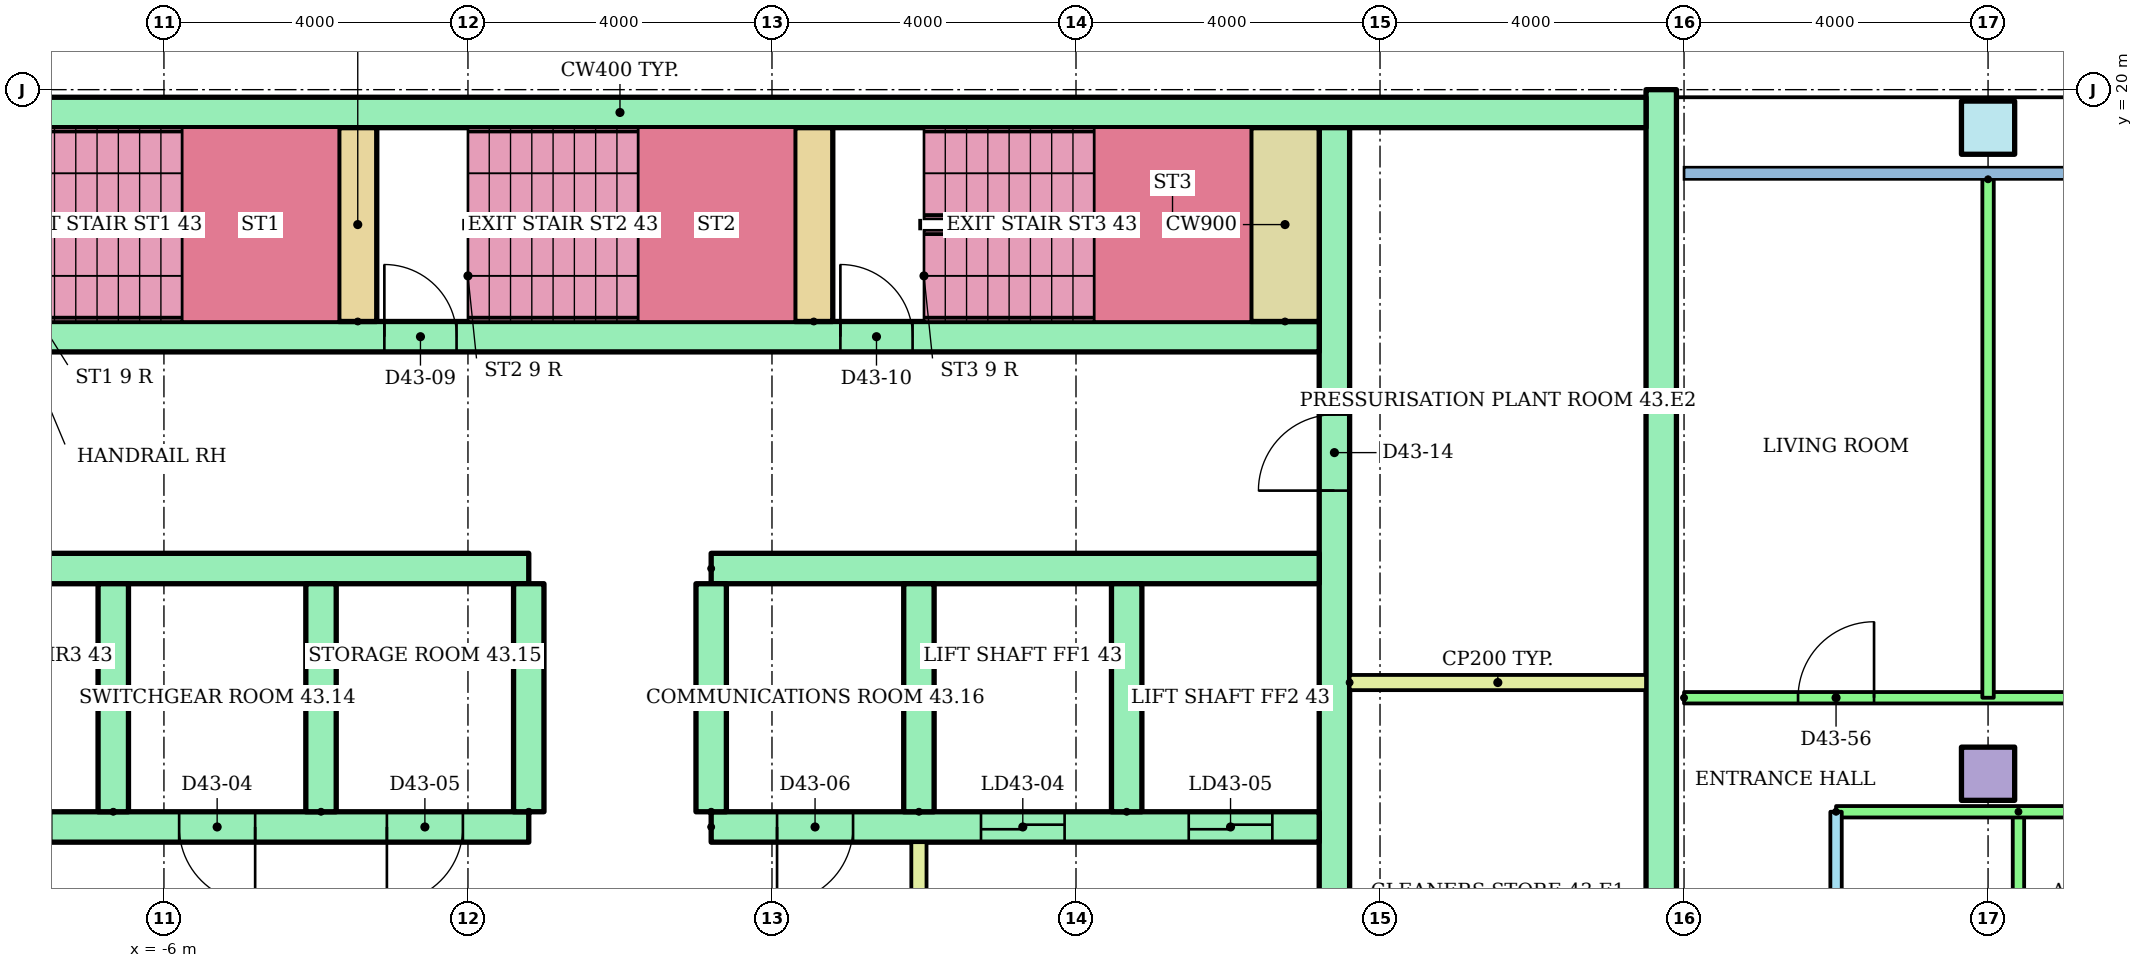
"""IFC4 building model, lengths in metres.
Left out: names, types, materials, properties, quantities, classifications, styles, units other than length and angle.
Written with IfcOpenShell. Run it as: python <this file> out.ifc"""

import sys

from ifc_helpers import new_model, si_unit, direction, frame, frame_2d, origin, origin_2d, place, context, subcontext, project, spatial, rectangle, hollow_rectangle, extrude, element, fill, save


model = new_model("IFC4")
c1 = context("Model", 3, precision=1e-05, world=origin(), true_north=direction((0.0, 1.0)))
c2 = subcontext(c1, "Body", "Model", "MODEL_VIEW")
j1 = project(units=[si_unit("LENGTHUNIT", "METRE"), si_unit("PLANEANGLEUNIT", "RADIAN")], contexts=[c1])
p1 = place(None, origin())
s1 = spatial("IfcSite", under=j1, at=p1, CompositionType="ELEMENT")
p2 = place(p1, origin())
s2 = spatial("IfcBuilding", under=s1, at=p2, CompositionType="ELEMENT")
p3 = place(p2, frame((0.0, 0.0, 168.5)))
s3 = spatial("IfcBuildingStorey", under=s2, at=p3, CompositionType="ELEMENT", Elevation=168.5)
p4 = place(p3, frame((18.0, 11.0, 0.0)))
e1 = element("IfcColumn", 1, at=p4, inside=s3, PredefinedType="COLUMN", context=c2, shape_type="SweptSolid", body=[
    extrude(rectangle(XDim=0.7, YDim=0.7, at=origin_2d()), origin(), (0.0, 0.0, 1.0), 3.2),
])
p5 = place(p3, frame((18.0, 19.5, 0.0)))
e2 = element("IfcColumn", 2, at=p5, inside=s3, PredefinedType="COLUMN", context=c2, shape_type="SweptSolid", body=[
    extrude(hollow_rectangle(XDim=0.7, YDim=0.7, WallThickness=0.036, at=origin_2d()), origin(), (0.0, 0.0, 1.0), 3.2),
])
p6 = place(p3, frame((13.7, 3.0, 0.0), z_axis=(0.0, 0.0, 1.0), x_axis=(0.0, 1.0, 0.0)))
e3 = element("IfcWall", 3, at=p6, inside=s3, PredefinedType="SHEAR", context=c2, shape_type="SweptSolid", body=[
    extrude(rectangle(XDim=17.0, YDim=0.4, at=frame_2d((8.5, 0.0))), origin(), (0.0, 0.0, 1.0), 2.92),
])
p7 = place(p3, frame((-13.5, 19.7, 0.0)))
e4 = element("IfcWall", 4, at=p7, inside=s3, PredefinedType="SHEAR", context=c2, shape_type="SweptSolid", body=[
    extrude(rectangle(XDim=27.0, YDim=0.4, at=frame_2d((13.5, 0.0))), origin(), (0.0, 0.0, 1.0), 2.92),
])
p8 = place(p3, frame((9.4, 6.8, 0.0), z_axis=(0.0, 0.0, 1.0), x_axis=(0.0, 1.0, 0.0)))
e5 = element("IfcWall", 5, at=p8, inside=s3, PredefinedType="SHEAR", context=c2, shape_type="SweptSolid", body=[
    extrude(rectangle(XDim=12.7, YDim=0.4, at=frame_2d((6.35, 0.0))), origin(), (0.0, 0.0, 1.0), 2.92),
])
p9 = place(p8, frame((1.15, 0.0, 0.0)))
e6 = element("IfcOpeningElement", 6, at=p9, cuts=e5, PredefinedType="OPENING", context=c2, shape_type="SweptSolid", body=[
    extrude(rectangle(XDim=1.0, YDim=2.1, at=frame_2d((0.5, 1.05))), frame((0.0, 0.21, 0.0), z_axis=(0.0, -1.0, 0.0), x_axis=(1.0, 0.0, 0.0)), (0.0, 0.0, 1.0), 0.42),
])
p10 = place(p8, frame((7.925, 0.0, 0.0)))
e7 = element("IfcOpeningElement", 7, at=p10, cuts=e5, PredefinedType="OPENING", context=c2, shape_type="SweptSolid", body=[
    extrude(rectangle(XDim=1.0, YDim=2.1, at=frame_2d((0.5, 1.05))), frame((0.0, 0.21, 0.0), z_axis=(0.0, -1.0, 0.0), x_axis=(1.0, 0.0, 0.0)), (0.0, 0.0, 1.0), 0.42),
])
p11 = place(p3, frame((-9.2, 10.3, 0.0)))
e8 = element("IfcWall", 8, at=p11, inside=s3, PredefinedType="SHEAR", context=c2, shape_type="SweptSolid", body=[
    extrude(rectangle(XDim=8.0, YDim=0.4, at=frame_2d((4.0, 0.0))), origin(), (0.0, 0.0, 1.0), 2.92),
])
p12 = place(p11, frame((0.617, 0.0, 0.0)))
e9 = element("IfcOpeningElement", 9, at=p12, cuts=e8, PredefinedType="OPENING", context=c2, shape_type="SweptSolid", body=[
    extrude(rectangle(XDim=1.1, YDim=2.1, at=frame_2d((0.55, 1.05))), frame((0.0, 0.21, 0.0), z_axis=(0.0, -1.0, 0.0), x_axis=(1.0, 0.0, 0.0)), (0.0, 0.0, 1.0), 0.42),
])
p13 = place(p11, frame((3.4, 0.0, 0.0)))
e10 = element("IfcOpeningElement", 10, at=p13, cuts=e8, PredefinedType="OPENING", context=c2, shape_type="SweptSolid", body=[
    extrude(rectangle(XDim=1.0, YDim=2.1, at=frame_2d((0.5, 1.05))), frame((0.0, 0.21, 0.0), z_axis=(0.0, -1.0, 0.0), x_axis=(1.0, 0.0, 0.0)), (0.0, 0.0, 1.0), 0.42),
])
p14 = place(p11, frame((6.133, 0.0, 0.0)))
e11 = element("IfcOpeningElement", 11, at=p14, cuts=e8, PredefinedType="OPENING", context=c2, shape_type="SweptSolid", body=[
    extrude(rectangle(XDim=1.0, YDim=2.1, at=frame_2d((0.5, 1.05))), frame((0.0, 0.21, 0.0), z_axis=(0.0, -1.0, 0.0), x_axis=(1.0, 0.0, 0.0)), (0.0, 0.0, 1.0), 0.42),
])
p15 = place(p3, frame((-9.2, 13.7, 0.0)))
e12 = element("IfcWall", 12, at=p15, inside=s3, PredefinedType="SHEAR", context=c2, shape_type="SweptSolid", body=[
    extrude(rectangle(XDim=8.0, YDim=0.4, at=frame_2d((4.0, 0.0))), origin(), (0.0, 0.0, 1.0), 2.92),
])
p16 = place(p3, frame((1.2, 10.3, 0.0)))
e13 = element("IfcWall", 13, at=p16, inside=s3, PredefinedType="SHEAR", context=c2, shape_type="SweptSolid", body=[
    extrude(rectangle(XDim=8.0, YDim=0.4, at=frame_2d((4.0, 0.0))), origin(), (0.0, 0.0, 1.0), 2.92),
])
p17 = place(p16, frame((3.55, 0.0, 0.0)))
e14 = element("IfcOpeningElement", 14, at=p17, cuts=e13, PredefinedType="OPENING", context=c2, shape_type="SweptSolid", body=[
    extrude(rectangle(XDim=1.1, YDim=2.1, at=frame_2d((0.55, 1.05))), frame((0.0, 0.21, 0.0), z_axis=(0.0, -1.0, 0.0), x_axis=(1.0, 0.0, 0.0)), (0.0, 0.0, 1.0), 0.42),
])
p18 = place(p16, frame((6.283, 0.0, 0.0)))
e15 = element("IfcOpeningElement", 15, at=p18, cuts=e13, PredefinedType="OPENING", context=c2, shape_type="SweptSolid", body=[
    extrude(rectangle(XDim=1.1, YDim=2.1, at=frame_2d((0.55, 1.05))), frame((0.0, 0.21, 0.0), z_axis=(0.0, -1.0, 0.0), x_axis=(1.0, 0.0, 0.0)), (0.0, 0.0, 1.0), 0.42),
])
p19 = place(p16, frame((0.867, 0.0, 0.0)))
e16 = element("IfcOpeningElement", 16, at=p19, cuts=e13, PredefinedType="OPENING", context=c2, shape_type="SweptSolid", body=[
    extrude(rectangle(XDim=1.0, YDim=2.1, at=frame_2d((0.5, 1.05))), frame((0.0, 0.21, 0.0), z_axis=(0.0, -1.0, 0.0), x_axis=(1.0, 0.0, 0.0)), (0.0, 0.0, 1.0), 0.42),
])
p20 = place(p3, frame((1.2, 13.7, 0.0)))
e17 = element("IfcWall", 17, at=p20, inside=s3, PredefinedType="SHEAR", context=c2, shape_type="SweptSolid", body=[
    extrude(rectangle(XDim=8.0, YDim=0.4, at=frame_2d((4.0, 0.0))), origin(), (0.0, 0.0, 1.0), 2.92),
])
for number, where, z_axis, x_axis in (
    (18, (-6.667, 10.5, 0.0), (0.0, 0.0, 1.0), (0.0, 1.0, 0.0)),
    (19, (-3.933, 10.5, 0.0), (0.0, 0.0, 1.0), (0.0, 1.0, 0.0)),
    (20, (-1.2, 10.5, 0.0), (0.0, 0.0, 1.0), (0.0, 1.0, 0.0)),
    (21, (1.2, 10.5, 0.0), (0.0, 0.0, 1.0), (0.0, 1.0, 0.0)),
    (22, (3.933, 10.5, 0.0), (0.0, 0.0, 1.0), (0.0, 1.0, 0.0)),
    (23, (6.667, 10.5, 0.0), (0.0, 0.0, 1.0), (0.0, 1.0, 0.0)),
):
    element("IfcWall", number, at=place(p3, frame(where, z_axis=z_axis, x_axis=x_axis)), inside=s3, PredefinedType="SHEAR", context=c2, shape_type="SweptSolid", body=[
        extrude(rectangle(XDim=3.0, YDim=0.4, at=frame_2d((1.5, 0.0))), origin(), (0.0, 0.0, 1.0), 2.92),
    ])
p21 = place(p3, frame((3.933, 6.8, 0.0), z_axis=(0.0, 0.0, 1.0), x_axis=(0.0, 1.0, 0.0)))
e24 = element("IfcWall", 24, at=p21, inside=s3, PredefinedType="PARTITIONING", context=c2, shape_type="SweptSolid", body=[
    extrude(rectangle(XDim=3.3, YDim=0.2, at=frame_2d((1.65, 0.0))), origin(), (0.0, 0.0, 1.0), 2.92),
])
p22 = place(p21, frame((1.1, 0.0, 0.0)))
e25 = element("IfcOpeningElement", 25, at=p22, cuts=e24, PredefinedType="OPENING", context=c2, shape_type="SweptSolid", body=[
    extrude(rectangle(XDim=1.1, YDim=2.1, at=frame_2d((0.55, 1.05))), frame((0.0, 0.11, 0.0), z_axis=(0.0, -1.0, 0.0), x_axis=(1.0, 0.0, 0.0)), (0.0, 0.0, 1.0), 0.22),
])
p23 = place(p3, frame((-9.2, 16.75, 0.0)))
e26 = element("IfcWall", 26, at=p23, inside=s3, PredefinedType="SHEAR", context=c2, shape_type="SweptSolid", body=[
    extrude(rectangle(XDim=18.4, YDim=0.4, at=frame_2d((9.2, 0.0))), origin(), (0.0, 0.0, 1.0), 2.92),
])
p24 = place(p23, frame((0.1, 0.0, 0.0)))
e27 = element("IfcOpeningElement", 27, at=p24, cuts=e26, PredefinedType="OPENING", context=c2, shape_type="SweptSolid", body=[
    extrude(rectangle(XDim=0.95, YDim=2.1, at=frame_2d((0.475, 1.05))), frame((0.0, 0.21, 0.0), z_axis=(0.0, -1.0, 0.0), x_axis=(1.0, 0.0, 0.0)), (0.0, 0.0, 1.0), 0.42),
])
p25 = place(p23, frame((6.1, 0.0, 0.0)))
e28 = element("IfcOpeningElement", 28, at=p25, cuts=e26, PredefinedType="OPENING", context=c2, shape_type="SweptSolid", body=[
    extrude(rectangle(XDim=0.95, YDim=2.1, at=frame_2d((0.475, 1.05))), frame((0.0, 0.21, 0.0), z_axis=(0.0, -1.0, 0.0), x_axis=(1.0, 0.0, 0.0)), (0.0, 0.0, 1.0), 0.42),
])
p26 = place(p23, frame((12.1, 0.0, 0.0)))
e29 = element("IfcOpeningElement", 29, at=p26, cuts=e26, PredefinedType="OPENING", context=c2, shape_type="SweptSolid", body=[
    extrude(rectangle(XDim=0.95, YDim=2.1, at=frame_2d((0.475, 1.05))), frame((0.0, 0.21, 0.0), z_axis=(0.0, -1.0, 0.0), x_axis=(1.0, 0.0, 0.0)), (0.0, 0.0, 1.0), 0.42),
])
for number, where, z_axis, x_axis in (
    (30, (-3.45, 16.95, 0.0), (0.0, 0.0, 1.0), (0.0, 1.0, 0.0)),
    (31, (2.55, 16.95, 0.0), (0.0, 0.0, 1.0), (0.0, 1.0, 0.0)),
):
    element("IfcWall", number, at=place(p3, frame(where, z_axis=z_axis, x_axis=x_axis)), inside=s3, PredefinedType="SHEAR", context=c2, shape_type="SweptSolid", body=[
        extrude(rectangle(XDim=2.55, YDim=0.5, at=frame_2d((1.275, 0.0))), origin(), (0.0, 0.0, 1.0), 2.92),
    ])
p27 = place(p3, frame((8.75, 16.95, 0.0), z_axis=(0.0, 0.0, 1.0), x_axis=(0.0, 1.0, 0.0)))
e32 = element("IfcWall", 32, at=p27, inside=s3, PredefinedType="SHEAR", context=c2, shape_type="SweptSolid", body=[
    extrude(rectangle(XDim=2.55, YDim=0.9, at=frame_2d((1.275, 0.0))), origin(), (0.0, 0.0, 1.0), 2.92),
])
p28 = place(p3, frame((9.6, 12.2, 0.0)))
e33 = element("IfcWall", 33, at=p28, inside=s3, PredefinedType="PARTITIONING", context=c2, shape_type="SweptSolid", body=[
    extrude(rectangle(XDim=3.9, YDim=0.2, at=frame_2d((1.95, 0.0))), origin(), (0.0, 0.0, 1.0), 2.92),
])
p29 = place(p3, frame((16.0, 10.5, 0.0), z_axis=(0.0, 0.0, 1.0), x_axis=(0.0, -1.0, 0.0)))
e34 = element("IfcWall", 34, at=p29, inside=s3, PredefinedType="PARTITIONING", context=c2, shape_type="SweptSolid", body=[
    extrude(rectangle(XDim=9.1, YDim=0.15, at=frame_2d((4.55, 0.0))), origin(), (0.0, 0.0, 1.0), 2.4),
])
p30 = place(p29, frame((6.15, 0.0, 0.0)))
e35 = element("IfcOpeningElement", 35, at=p30, cuts=e34, PredefinedType="OPENING", context=c2, shape_type="SweptSolid", body=[
    extrude(rectangle(XDim=0.9, YDim=2.1, at=frame_2d((0.45, 1.05))), frame((0.0, 0.085, 0.0), z_axis=(0.0, -1.0, 0.0), x_axis=(1.0, 0.0, 0.0)), (0.0, 0.0, 1.0), 0.17),
])
p31 = place(p29, frame((1.65, 0.0, 0.0)))
e36 = element("IfcOpeningElement", 36, at=p31, cuts=e34, PredefinedType="OPENING", context=c2, shape_type="SweptSolid", body=[
    extrude(rectangle(XDim=0.8, YDim=2.1, at=frame_2d((0.4, 1.05))), frame((0.0, 0.085, 0.0), z_axis=(0.0, -1.0, 0.0), x_axis=(1.0, 0.0, 0.0)), (0.0, 0.0, 1.0), 0.17),
])
p32 = place(p3, frame((18.4, 10.5, 0.0), z_axis=(0.0, 0.0, 1.0), x_axis=(0.0, -1.0, 0.0)))
e37 = element("IfcWall", 37, at=p32, inside=s3, PredefinedType="PARTITIONING", context=c2, shape_type="SweptSolid", body=[
    extrude(rectangle(XDim=9.1, YDim=0.15, at=frame_2d((4.55, 0.0))), origin(), (0.0, 0.0, 1.0), 2.4),
])
p33 = place(p3, frame((26.0, 10.5, 0.0), z_axis=(0.0, 0.0, 1.0), x_axis=(-1.0, 0.0, 0.0)))
e38 = element("IfcWall", 38, at=p33, inside=s3, PredefinedType="PARTITIONING", context=c2, shape_type="SweptSolid", body=[
    extrude(rectangle(XDim=10.0, YDim=0.15, at=frame_2d((5.0, 0.0))), origin(), (0.0, 0.0, 1.0), 2.4),
])
p34 = place(p33, frame((4.9, 0.0, 0.0)))
e39 = element("IfcOpeningElement", 39, at=p34, cuts=e38, PredefinedType="OPENING", context=c2, shape_type="SweptSolid", body=[
    extrude(rectangle(XDim=0.9, YDim=2.1, at=frame_2d((0.45, 1.05))), frame((0.0, 0.085, 0.0), z_axis=(0.0, -1.0, 0.0), x_axis=(1.0, 0.0, 0.0)), (0.0, 0.0, 1.0), 0.17),
])
p35 = place(p33, frame((1.1, 0.0, 0.0)))
e40 = element("IfcOpeningElement", 40, at=p35, cuts=e38, PredefinedType="OPENING", context=c2, shape_type="SweptSolid", body=[
    extrude(rectangle(XDim=0.9, YDim=2.1, at=frame_2d((0.45, 1.05))), frame((0.0, 0.085, 0.0), z_axis=(0.0, -1.0, 0.0), x_axis=(1.0, 0.0, 0.0)), (0.0, 0.0, 1.0), 0.17),
])
p36 = place(p3, frame((14.0, 12.0, 0.0)))
e41 = element("IfcWall", 41, at=p36, inside=s3, PredefinedType="PARTITIONING", context=c2, shape_type="SweptSolid", body=[
    extrude(rectangle(XDim=12.0, YDim=0.15, at=frame_2d((6.0, 0.0))), origin(), (0.0, 0.0, 1.0), 2.4),
])
p37 = place(p36, frame((1.5, 0.0, 0.0)))
e42 = element("IfcOpeningElement", 42, at=p37, cuts=e41, PredefinedType="OPENING", context=c2, shape_type="SweptSolid", body=[
    extrude(rectangle(XDim=1.0, YDim=2.1, at=frame_2d((0.5, 1.05))), frame((0.0, 0.085, 0.0), z_axis=(0.0, -1.0, 0.0), x_axis=(1.0, 0.0, 0.0)), (0.0, 0.0, 1.0), 0.17),
])
p38 = place(p36, frame((7.55, 0.0, 0.0)))
e43 = element("IfcOpeningElement", 43, at=p38, cuts=e41, PredefinedType="OPENING", context=c2, shape_type="SweptSolid", body=[
    extrude(rectangle(XDim=0.9, YDim=2.1, at=frame_2d((0.45, 1.05))), frame((0.0, 0.085, 0.0), z_axis=(0.0, -1.0, 0.0), x_axis=(1.0, 0.0, 0.0)), (0.0, 0.0, 1.0), 0.17),
])
p39 = place(p3, frame((18.0, 18.821, 0.0), z_axis=(0.0, 0.0, 1.0), x_axis=(0.0, -1.0, 0.0)))
e44 = element("IfcWall", 44, at=p39, inside=s3, PredefinedType="PARTITIONING", context=c2, shape_type="SweptSolid", body=[
    extrude(rectangle(XDim=6.821, YDim=0.15, at=frame_2d((3.411, 0.0))), origin(), (0.0, 0.0, 1.0), 2.4),
])
p40 = place(p17, origin())
e45 = element("IfcDoor", 45, at=p40, inside=s3, OperationType="SLIDING_TO_LEFT", PredefinedType="DOOR", context=c2, shape_type="SweptSolid", body=[
    extrude(rectangle(XDim=1.1, YDim=2.1, at=frame_2d((0.55, 1.05))), frame((0.0, 0.025, 0.0), z_axis=(0.0, -1.0, 0.0), x_axis=(1.0, 0.0, 0.0)), (0.0, 0.0, 1.0), 0.05),
])
fill(e14, e45)
p41 = place(p18, origin())
e46 = element("IfcDoor", 46, at=p41, inside=s3, OperationType="SLIDING_TO_LEFT", PredefinedType="DOOR", context=c2, shape_type="SweptSolid", body=[
    extrude(rectangle(XDim=1.1, YDim=2.1, at=frame_2d((0.55, 1.05))), frame((0.0, 0.025, 0.0), z_axis=(0.0, -1.0, 0.0), x_axis=(1.0, 0.0, 0.0)), (0.0, 0.0, 1.0), 0.05),
])
fill(e15, e46)
p42 = place(p13, frame((1.0, 0.0, 0.0), z_axis=(0.0, 0.0, 1.0), x_axis=(-1.0, 0.0, 0.0)))
e47 = element("IfcDoor", 47, at=p42, inside=s3, OperationType="SINGLE_SWING_RIGHT", PredefinedType="DOOR", context=c2, shape_type="SweptSolid", body=[
    extrude(rectangle(XDim=1.0, YDim=2.1, at=frame_2d((0.5, 1.05))), frame((0.0, 0.025, 0.0), z_axis=(0.0, -1.0, 0.0), x_axis=(1.0, 0.0, 0.0)), (0.0, 0.0, 1.0), 0.05),
])
fill(e10, e47)
p43 = place(p14, frame((1.0, 0.0, 0.0), z_axis=(0.0, 0.0, 1.0), x_axis=(-1.0, 0.0, 0.0)))
e48 = element("IfcDoor", 48, at=p43, inside=s3, OperationType="SINGLE_SWING_LEFT", PredefinedType="DOOR", context=c2, shape_type="SweptSolid", body=[
    extrude(rectangle(XDim=1.0, YDim=2.1, at=frame_2d((0.5, 1.05))), frame((0.0, 0.025, 0.0), z_axis=(0.0, -1.0, 0.0), x_axis=(1.0, 0.0, 0.0)), (0.0, 0.0, 1.0), 0.05),
])
fill(e11, e48)
p44 = place(p19, frame((1.0, 0.0, 0.0), z_axis=(0.0, 0.0, 1.0), x_axis=(-1.0, 0.0, 0.0)))
e49 = element("IfcDoor", 49, at=p44, inside=s3, OperationType="SINGLE_SWING_LEFT", PredefinedType="DOOR", context=c2, shape_type="SweptSolid", body=[
    extrude(rectangle(XDim=1.0, YDim=2.1, at=frame_2d((0.5, 1.05))), frame((0.0, 0.025, 0.0), z_axis=(0.0, -1.0, 0.0), x_axis=(1.0, 0.0, 0.0)), (0.0, 0.0, 1.0), 0.05),
])
fill(e16, e49)
p45 = place(p25, origin())
e50 = element("IfcDoor", 50, at=p45, inside=s3, OperationType="SINGLE_SWING_LEFT", PredefinedType="DOOR", context=c2, shape_type="SweptSolid", body=[
    extrude(rectangle(XDim=0.95, YDim=2.1, at=frame_2d((0.475, 1.05))), frame((0.0, 0.025, 0.0), z_axis=(0.0, -1.0, 0.0), x_axis=(1.0, 0.0, 0.0)), (0.0, 0.0, 1.0), 0.05),
])
fill(e28, e50)
p46 = place(p26, origin())
e51 = element("IfcDoor", 51, at=p46, inside=s3, OperationType="SINGLE_SWING_LEFT", PredefinedType="DOOR", context=c2, shape_type="SweptSolid", body=[
    extrude(rectangle(XDim=0.95, YDim=2.1, at=frame_2d((0.475, 1.05))), frame((0.0, 0.025, 0.0), z_axis=(0.0, -1.0, 0.0), x_axis=(1.0, 0.0, 0.0)), (0.0, 0.0, 1.0), 0.05),
])
fill(e29, e51)
p47 = place(p10, origin())
e52 = element("IfcDoor", 52, at=p47, inside=s3, OperationType="SINGLE_SWING_LEFT", PredefinedType="DOOR", context=c2, shape_type="SweptSolid", body=[
    extrude(rectangle(XDim=1.0, YDim=2.1, at=frame_2d((0.5, 1.05))), frame((0.0, 0.025, 0.0), z_axis=(0.0, -1.0, 0.0), x_axis=(1.0, 0.0, 0.0)), (0.0, 0.0, 1.0), 0.05),
])
fill(e7, e52)
p48 = place(p37, origin())
e53 = element("IfcDoor", 53, at=p48, inside=s3, OperationType="SINGLE_SWING_RIGHT", PredefinedType="DOOR", context=c2, shape_type="SweptSolid", body=[
    extrude(rectangle(XDim=1.0, YDim=2.1, at=frame_2d((0.5, 1.05))), frame((0.0, 0.025, 0.0), z_axis=(0.0, -1.0, 0.0), x_axis=(1.0, 0.0, 0.0)), (0.0, 0.0, 1.0), 0.05),
])
fill(e42, e53)
save(model, sys.argv[1])
